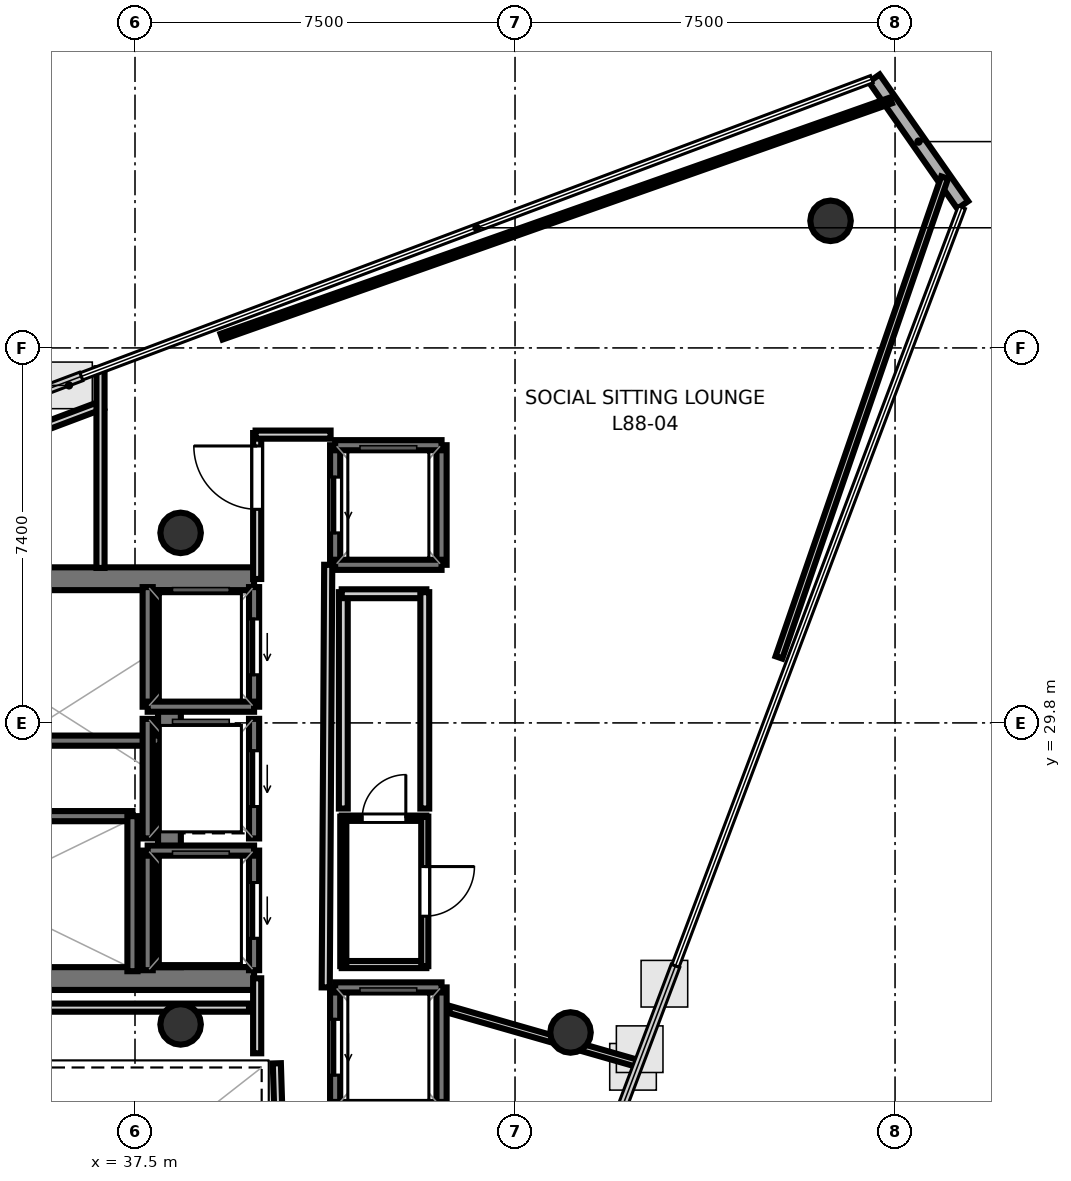
"""IFC4 building model, lengths in metres.
Left out: names, types, materials, properties, quantities, classifications, styles, units other than length and angle.
Written with IfcOpenShell. Run it as: python <this file> out.ifc"""

import sys

from ifc_helpers import new_model, si_unit, direction, frame, frame_2d, origin, origin_2d, place, context, subcontext, project, spatial, rectangle, hollow_circle, extrude, element, fill, save


model = new_model("IFC4")
c1 = context("Model", 3, precision=1e-05, world=origin(), true_north=direction((0.0, 1.0)))
c2 = subcontext(c1, "Body", "Model", "MODEL_VIEW")
j1 = project(units=[si_unit("LENGTHUNIT", "METRE"), si_unit("PLANEANGLEUNIT", "RADIAN")], contexts=[c1])
p1 = place(None, origin())
s1 = spatial("IfcSite", under=j1, at=p1, CompositionType="ELEMENT")
p2 = place(p1, origin())
s2 = spatial("IfcBuilding", under=s1, at=p2, CompositionType="ELEMENT")
p3 = place(p2, frame((0.0, 0.0, 340.7)))
s3 = spatial("IfcBuildingStorey", under=s2, at=p3, CompositionType="ELEMENT", Elevation=340.7)
p4 = place(p3, frame((29.33, 32.645, 0.0), z_axis=(0.0, 0.0, 1.0), x_axis=(1.0, 0.0, 0.0)))
e1 = element("IfcWall", 1, at=p4, inside=s3, PredefinedType="SHEAR", context=c2, shape_type="SweptSolid", body=[
    extrude(rectangle(XDim=10.52, YDim=0.45, at=frame_2d((5.26, 0.0))), origin(), (0.0, 0.0, 1.0), 3.52),
])
p5 = place(p4, frame((0.895, 0.0, 0.0)))
e2 = element("IfcOpeningElement", 2, at=p5, cuts=e1, PredefinedType="OPENING", context=c2, shape_type="SweptSolid", body=[
    extrude(rectangle(XDim=1.25, YDim=2.15, at=frame_2d((0.625, 1.075))), frame((0.0, 0.235, 0.0), z_axis=(0.0, -1.0, 0.0), x_axis=(1.0, 0.0, 0.0)), (0.0, 0.0, 1.0), 0.47),
])
p6 = place(p3, frame((29.33, 24.755, 0.0), z_axis=(0.0, 0.0, 1.0), x_axis=(1.0, 0.0, 0.0)))
e3 = element("IfcWall", 3, at=p6, inside=s3, PredefinedType="SHEAR", context=c2, shape_type="SweptSolid", body=[
    extrude(rectangle(XDim=10.52, YDim=0.45, at=frame_2d((5.26, 0.0))), origin(), (0.0, 0.0, 1.0), 3.52),
])
p7 = place(p6, frame((0.695, 0.0, 0.0)))
e4 = element("IfcOpeningElement", 4, at=p7, cuts=e3, PredefinedType="OPENING", context=c2, shape_type="SweptSolid", body=[
    extrude(rectangle(XDim=1.25, YDim=2.15, at=frame_2d((0.625, 1.075))), frame((0.0, 0.235, 0.0), z_axis=(0.0, -1.0, 0.0), x_axis=(1.0, 0.0, 0.0)), (0.0, 0.0, 1.0), 0.47),
])
p8 = place(p3, frame((38.18, 24.98, 0.0), z_axis=(0.0, 0.0, 1.0), x_axis=(0.0, 1.0, 0.0)))
e5 = element("IfcWall", 5, at=p8, inside=s3, PredefinedType="SHEAR", context=c2, shape_type="SweptSolid", body=[
    extrude(rectangle(XDim=7.44, YDim=0.45, at=frame_2d((3.72, 0.0))), origin(), (0.0, 0.0, 1.0), 3.52),
])
for number, where, z_axis, x_axis in (
    (6, (38.4, 33.55, 0.0), (0.0, 0.0, 1.0), (1.0, 0.0, 0.0)),
    (7, (38.4, 23.85, 0.0), (0.0, 0.0, 1.0), (1.0, 0.0, 0.0)),
    (8, (51.227, 39.708, 0.0), (0.0, 0.0, 1.0), (1.0, 0.0, 0.0)),
    (9, (46.095, 23.691, 0.0), (0.0, 0.0, 1.0), (1.0, 0.0, 0.0)),
):
    element("IfcColumn", number, at=place(p3, frame(where, z_axis=z_axis, x_axis=x_axis)), inside=s3, PredefinedType="COLUMN", context=c2, shape_type="SweptSolid", body=[
        extrude(hollow_circle(Radius=0.4, WallThickness=0.022, at=origin_2d()), origin(), (0.0, 0.0, 1.0), 3.7),
    ])
p9 = place(p3, frame((53.836, 40.021, 0.0), z_axis=(0.0, 0.0, 1.0), x_axis=(-0.572667183725, 0.819787958368, 0.0)))
e10 = element("IfcWall", 10, at=p9, inside=s3, PredefinedType="SOLIDWALL", context=c2, shape_type="SweptSolid", body=[
    extrude(rectangle(XDim=3.051, YDim=0.26, at=frame_2d((1.525, 0.0))), origin(), (0.0, 0.0, 1.0), 3.52),
])
p10 = place(p3, frame((29.7, 29.45, 0.0), z_axis=(0.0, 0.0, 1.0), x_axis=(1.0, 0.0, 0.0)))
e11 = element("IfcWall", 11, at=p10, inside=s3, PredefinedType="SOLIDWALL", context=c2, shape_type="SweptSolid", body=[
    extrude(rectangle(XDim=8.3, YDim=0.2, at=frame_2d((4.15, 0.0))), origin(), (0.0, 0.0, 1.0), 3.52),
])
p11 = place(p3, frame((29.7, 27.96, 0.0), z_axis=(0.0, 0.0, 1.0), x_axis=(1.0, 0.0, 0.0)))
e12 = element("IfcWall", 12, at=p11, inside=s3, PredefinedType="SOLIDWALL", context=c2, shape_type="SweptSolid", body=[
    extrude(rectangle(XDim=7.75, YDim=0.2, at=frame_2d((3.875, 0.0))), origin(), (0.0, 0.0, 1.0), 3.52),
])
p12 = place(p3, frame((37.45, 24.9, 0.0), z_axis=(0.0, 0.0, 1.0), x_axis=(0.0, 1.0, 0.0)))
e13 = element("IfcWall", 13, at=p12, inside=s3, PredefinedType="SOLIDWALL", context=c2, shape_type="SweptSolid", body=[
    extrude(rectangle(XDim=3.06, YDim=0.2, at=frame_2d((1.53, 0.0))), origin(), (0.0, 0.0, 1.0), 3.52),
])
p13 = place(p3, frame((39.85, 30.12, 0.0), z_axis=(0.0, 0.0, 1.0), x_axis=(0.0, 1.0, 0.0)))
e14 = element("IfcWall", 14, at=p13, inside=s3, PredefinedType="SOLIDWALL", context=c2, shape_type="SweptSolid", body=[
    extrude(rectangle(XDim=2.36, YDim=0.2, at=frame_2d((1.18, 0.0))), origin(), (0.0, 0.0, 1.0), 3.52),
])
p14 = place(p13, frame((0.63, 0.0, 0.0)))
e15 = element("IfcOpeningElement", 15, at=p14, cuts=e14, PredefinedType="OPENING", context=c2, shape_type="SweptSolid", body=[
    extrude(rectangle(XDim=1.1, YDim=2.15, at=frame_2d((0.55, 1.075))), frame((0.0, 0.11, 0.0), z_axis=(0.0, -1.0, 0.0), x_axis=(1.0, 0.0, 0.0)), (0.0, 0.0, 1.0), 0.22),
])
p15 = place(p3, frame((37.75, 30.12, 0.0), z_axis=(0.0, 0.0, 1.0), x_axis=(0.0, 1.0, 0.0)))
e16 = element("IfcWall", 16, at=p15, inside=s3, PredefinedType="SOLIDWALL", context=c2, shape_type="SweptSolid", body=[
    extrude(rectangle(XDim=2.36, YDim=0.2, at=frame_2d((1.18, 0.0))), origin(), (0.0, 0.0, 1.0), 3.52),
])
p16 = place(p3, frame((37.75, 30.12, 0.0), z_axis=(0.0, 0.0, 1.0), x_axis=(1.0, 0.0, 0.0)))
e17 = element("IfcWall", 17, at=p16, inside=s3, PredefinedType="SOLIDWALL", context=c2, shape_type="SweptSolid", body=[
    extrude(rectangle(XDim=2.1, YDim=0.2, at=frame_2d((1.05, 0.0))), origin(), (0.0, 0.0, 1.0), 3.52),
])
p17 = place(p3, frame((39.85, 24.92, 0.0), z_axis=(0.0, 0.0, 1.0), x_axis=(0.0, 1.0, 0.0)))
e18 = element("IfcWall", 18, at=p17, inside=s3, PredefinedType="SOLIDWALL", context=c2, shape_type="SweptSolid", body=[
    extrude(rectangle(XDim=2.36, YDim=0.2, at=frame_2d((1.18, 0.0))), origin(), (0.0, 0.0, 1.0), 3.52),
])
p18 = place(p17, frame((0.63, 0.0, 0.0)))
e19 = element("IfcOpeningElement", 19, at=p18, cuts=e18, PredefinedType="OPENING", context=c2, shape_type="SweptSolid", body=[
    extrude(rectangle(XDim=1.1, YDim=2.15, at=frame_2d((0.55, 1.075))), frame((0.0, 0.11, 0.0), z_axis=(0.0, -1.0, 0.0), x_axis=(1.0, 0.0, 0.0)), (0.0, 0.0, 1.0), 0.22),
])
p19 = place(p3, frame((37.75, 24.92, 0.0), z_axis=(0.0, 0.0, 1.0), x_axis=(0.0, 1.0, 0.0)))
e20 = element("IfcWall", 20, at=p19, inside=s3, PredefinedType="SOLIDWALL", context=c2, shape_type="SweptSolid", body=[
    extrude(rectangle(XDim=2.36, YDim=0.2, at=frame_2d((1.18, 0.0))), origin(), (0.0, 0.0, 1.0), 3.52),
])
p20 = place(p3, frame((37.75, 27.28, 0.0), z_axis=(0.0, 0.0, 1.0), x_axis=(1.0, 0.0, 0.0)))
e21 = element("IfcWall", 21, at=p20, inside=s3, PredefinedType="SOLIDWALL", context=c2, shape_type="SweptSolid", body=[
    extrude(rectangle(XDim=2.1, YDim=0.2, at=frame_2d((1.05, 0.0))), origin(), (0.0, 0.0, 1.0), 3.52),
])
p21 = place(p3, frame((39.85, 27.52, 0.0), z_axis=(0.0, 0.0, 1.0), x_axis=(0.0, 1.0, 0.0)))
e22 = element("IfcWall", 22, at=p21, inside=s3, PredefinedType="SOLIDWALL", context=c2, shape_type="SweptSolid", body=[
    extrude(rectangle(XDim=2.36, YDim=0.2, at=frame_2d((1.18, 0.0))), origin(), (0.0, 0.0, 1.0), 3.52),
])
p22 = place(p21, frame((0.63, 0.0, 0.0)))
e23 = element("IfcOpeningElement", 23, at=p22, cuts=e22, PredefinedType="OPENING", context=c2, shape_type="SweptSolid", body=[
    extrude(rectangle(XDim=1.1, YDim=2.15, at=frame_2d((0.55, 1.075))), frame((0.0, 0.11, 0.0), z_axis=(0.0, -1.0, 0.0), x_axis=(1.0, 0.0, 0.0)), (0.0, 0.0, 1.0), 0.22),
])
p23 = place(p3, frame((37.75, 27.52, 0.0), z_axis=(0.0, 0.0, 1.0), x_axis=(0.0, 1.0, 0.0)))
e24 = element("IfcWall", 24, at=p23, inside=s3, PredefinedType="SOLIDWALL", context=c2, shape_type="SweptSolid", body=[
    extrude(rectangle(XDim=2.36, YDim=0.2, at=frame_2d((1.18, 0.0))), origin(), (0.0, 0.0, 1.0), 3.52),
])
p24 = place(p3, frame((43.55, 22.22, 0.0), z_axis=(0.0, 0.0, 1.0), x_axis=(0.0, 1.0, 0.0)))
e25 = element("IfcWall", 25, at=p24, inside=s3, PredefinedType="SOLIDWALL", context=c2, shape_type="SweptSolid", body=[
    extrude(rectangle(XDim=2.36, YDim=0.2, at=frame_2d((1.18, 0.0))), origin(), (0.0, 0.0, 1.0), 3.52),
])
p25 = place(p3, frame((41.45, 22.22, 0.0), z_axis=(0.0, 0.0, 1.0), x_axis=(0.0, 1.0, 0.0)))
e26 = element("IfcWall", 26, at=p25, inside=s3, PredefinedType="SOLIDWALL", context=c2, shape_type="SweptSolid", body=[
    extrude(rectangle(XDim=2.36, YDim=0.2, at=frame_2d((1.18, 0.0))), origin(), (0.0, 0.0, 1.0), 3.52),
])
p26 = place(p25, frame((0.63, 0.0, 0.0)))
e27 = element("IfcOpeningElement", 27, at=p26, cuts=e26, PredefinedType="OPENING", context=c2, shape_type="SweptSolid", body=[
    extrude(rectangle(XDim=1.1, YDim=2.15, at=frame_2d((0.55, 1.075))), frame((0.0, 0.11, 0.0), z_axis=(0.0, -1.0, 0.0), x_axis=(1.0, 0.0, 0.0)), (0.0, 0.0, 1.0), 0.22),
])
for number, where, z_axis, x_axis in (
    (28, (41.45, 24.58, 0.0), (0.0, 0.0, 1.0), (1.0, 0.0, 0.0)),
    (29, (41.45, 22.22, 0.0), (0.0, 0.0, 1.0), (1.0, 0.0, 0.0)),
):
    element("IfcWall", number, at=place(p3, frame(where, z_axis=z_axis, x_axis=x_axis)), inside=s3, PredefinedType="SOLIDWALL", context=c2, shape_type="SweptSolid", body=[
        extrude(rectangle(XDim=2.1, YDim=0.2, at=frame_2d((1.05, 0.0))), origin(), (0.0, 0.0, 1.0), 3.52),
    ])
p27 = place(p3, frame((43.55, 32.92, 0.0), z_axis=(0.0, 0.0, 1.0), x_axis=(0.0, 1.0, 0.0)))
e30 = element("IfcWall", 30, at=p27, inside=s3, PredefinedType="SOLIDWALL", context=c2, shape_type="SweptSolid", body=[
    extrude(rectangle(XDim=2.36, YDim=0.2, at=frame_2d((1.18, 0.0))), origin(), (0.0, 0.0, 1.0), 3.52),
])
p28 = place(p3, frame((41.45, 32.92, 0.0), z_axis=(0.0, 0.0, 1.0), x_axis=(0.0, 1.0, 0.0)))
e31 = element("IfcWall", 31, at=p28, inside=s3, PredefinedType="SOLIDWALL", context=c2, shape_type="SweptSolid", body=[
    extrude(rectangle(XDim=2.36, YDim=0.2, at=frame_2d((1.18, 0.0))), origin(), (0.0, 0.0, 1.0), 3.52),
])
p29 = place(p28, frame((0.63, 0.0, 0.0)))
e32 = element("IfcOpeningElement", 32, at=p29, cuts=e31, PredefinedType="OPENING", context=c2, shape_type="SweptSolid", body=[
    extrude(rectangle(XDim=1.1, YDim=2.15, at=frame_2d((0.55, 1.075))), frame((0.0, 0.11, 0.0), z_axis=(0.0, -1.0, 0.0), x_axis=(1.0, 0.0, 0.0)), (0.0, 0.0, 1.0), 0.22),
])
for number, where, z_axis, x_axis in (
    (33, (41.45, 35.28, 0.0), (0.0, 0.0, 1.0), (1.0, 0.0, 0.0)),
    (34, (41.45, 32.92, 0.0), (0.0, 0.0, 1.0), (1.0, 0.0, 0.0)),
):
    element("IfcWall", number, at=place(p3, frame(where, z_axis=z_axis, x_axis=x_axis)), inside=s3, PredefinedType="SOLIDWALL", context=c2, shape_type="SweptSolid", body=[
        extrude(rectangle(XDim=2.1, YDim=0.2, at=frame_2d((1.05, 0.0))), origin(), (0.0, 0.0, 1.0), 3.52),
    ])
p30 = place(p3, frame((29.761, 33.409, 0.0), z_axis=(0.0, 0.0, 1.0), x_axis=(0.936004712995, 0.351987467464, 0.0)))
e35 = element("IfcWall", 35, at=p30, inside=s3, PredefinedType="PARTITIONING", context=c2, shape_type="SweptSolid", body=[
    extrude(rectangle(XDim=7.585, YDim=0.16, at=frame_2d((3.792, 0.0))), origin(), (0.0, 0.0, 1.0), 2.84),
])
p31 = place(p3, frame((36.819, 36.8, 0.0), z_axis=(0.0, 0.0, 1.0), x_axis=(0.0, -1.0, 0.0)))
e36 = element("IfcWall", 36, at=p31, inside=s3, PredefinedType="PARTITIONING", context=c2, shape_type="SweptSolid", body=[
    extrude(rectangle(XDim=3.942, YDim=0.16, at=frame_2d((1.971, 0.0))), origin(), (0.0, 0.0, 1.0), 2.84),
])
p32 = place(p3, frame((40.351, 21.401, 0.0), z_axis=(0.0, 0.0, 1.0), x_axis=(-0.031058045979, 0.999517582527, 0.0)))
e37 = element("IfcWall", 37, at=p32, inside=s3, PredefinedType="PARTITIONING", context=c2, shape_type="SweptSolid", body=[
    extrude(rectangle(XDim=1.682, YDim=0.16, at=frame_2d((0.841, 0.0))), origin(), (0.0, 0.0, 1.0), 2.84),
])
p33 = place(p3, frame((39.911, 23.28, 0.0), z_axis=(0.0, 0.0, 1.0), x_axis=(0.0, 1.0, 0.0)))
e38 = element("IfcWall", 38, at=p33, inside=s3, PredefinedType="PARTITIONING", context=c2, shape_type="SweptSolid", body=[
    extrude(rectangle(XDim=1.48, YDim=0.16, at=frame_2d((0.74, 0.0))), origin(), (0.0, 0.0, 1.0), 2.84),
])
p34 = place(p3, frame((39.911, 32.64, 0.0), z_axis=(0.0, 0.0, 1.0), x_axis=(0.0, 1.0, 0.0)))
e39 = element("IfcWall", 39, at=p34, inside=s3, PredefinedType="PARTITIONING", context=c2, shape_type="SweptSolid", body=[
    extrude(rectangle(XDim=2.88, YDim=0.16, at=frame_2d((1.44, 0.0))), origin(), (0.0, 0.0, 1.0), 2.84),
])
p35 = place(p34, frame((1.375, 0.0, 0.0)))
e40 = element("IfcOpeningElement", 40, at=p35, cuts=e39, PredefinedType="OPENING", context=c2, shape_type="SweptSolid", body=[
    extrude(rectangle(XDim=1.25, YDim=2.2, at=frame_2d((0.625, 1.1))), frame((0.0, 0.09, 0.0), z_axis=(0.0, -1.0, 0.0), x_axis=(1.0, 0.0, 0.0)), (0.0, 0.0, 1.0), 0.18),
])
p36 = place(p3, frame((39.88, 35.489, 0.0), z_axis=(0.0, 0.0, 1.0), x_axis=(1.0, 0.0, 0.0)))
e41 = element("IfcWall", 41, at=p36, inside=s3, PredefinedType="PARTITIONING", context=c2, shape_type="SweptSolid", body=[
    extrude(rectangle(XDim=1.48, YDim=0.16, at=frame_2d((0.74, 0.0))), origin(), (0.0, 0.0, 1.0), 2.84),
])
p37 = place(p3, frame((41.313, 32.92, 0.0), z_axis=(0.0, 0.0, 1.0), x_axis=(-0.005942518022, -0.999982343084, 0.0)))
e42 = element("IfcWall", 42, at=p37, inside=s3, PredefinedType="PARTITIONING", context=c2, shape_type="SweptSolid", body=[
    extrude(rectangle(XDim=8.34, YDim=0.16, at=frame_2d((4.17, 0.0))), origin(), (0.0, 0.0, 1.0), 2.84),
])
p38 = place(p3, frame((43.25, 25.031, 0.0), z_axis=(0.0, 0.0, 1.0), x_axis=(-1.0, 0.0, 0.0)))
e43 = element("IfcWall", 43, at=p38, inside=s3, PredefinedType="PARTITIONING", context=c2, shape_type="SweptSolid", body=[
    extrude(rectangle(XDim=1.67, YDim=0.14, at=frame_2d((0.835, 0.0))), origin(), (0.0, 0.0, 1.0), 2.84),
])
p39 = place(p3, frame((41.611, 25.0, 0.0), z_axis=(0.0, 0.0, 1.0), x_axis=(0.0, 1.0, 0.0)))
e44 = element("IfcWall", 44, at=p39, inside=s3, PredefinedType="PARTITIONING", context=c2, shape_type="SweptSolid", body=[
    extrude(rectangle(XDim=2.95, YDim=0.12, at=frame_2d((1.475, 0.0))), origin(), (0.0, 0.0, 1.0), 2.84),
])
p40 = place(p3, frame((41.58, 27.919, 0.0), z_axis=(0.0, 0.0, 1.0), x_axis=(1.0, 0.0, 0.0)))
e45 = element("IfcWall", 45, at=p40, inside=s3, PredefinedType="PARTITIONING", context=c2, shape_type="SweptSolid", body=[
    extrude(rectangle(XDim=1.67, YDim=0.105, at=frame_2d((0.835, 0.0))), origin(), (0.0, 0.0, 1.0), 2.84),
])
p41 = place(p40, frame((0.405, 0.0, 0.0)))
e46 = element("IfcOpeningElement", 46, at=p41, cuts=e45, PredefinedType="OPENING", context=c2, shape_type="SweptSolid", body=[
    extrude(rectangle(XDim=0.86, YDim=2.05, at=frame_2d((0.43, 1.025))), frame((0.0, 0.062, 0.0), z_axis=(0.0, -1.0, 0.0), x_axis=(1.0, 0.0, 0.0)), (0.0, 0.0, 1.0), 0.125),
])
p42 = place(p3, frame((43.219, 27.95, 0.0), z_axis=(0.0, 0.0, 1.0), x_axis=(0.0, -1.0, 0.0)))
e47 = element("IfcWall", 47, at=p42, inside=s3, PredefinedType="PARTITIONING", context=c2, shape_type="SweptSolid", body=[
    extrude(rectangle(XDim=2.95, YDim=0.14, at=frame_2d((1.475, 0.0))), origin(), (0.0, 0.0, 1.0), 2.84),
])
p43 = place(p42, frame((0.985, 0.0, 0.0)))
e48 = element("IfcOpeningElement", 48, at=p43, cuts=e47, PredefinedType="OPENING", context=c2, shape_type="SweptSolid", body=[
    extrude(rectangle(XDim=0.98, YDim=2.1, at=frame_2d((0.49, 1.05))), frame((0.0, 0.08, 0.0), z_axis=(0.0, -1.0, 0.0), x_axis=(1.0, 0.0, 0.0)), (0.0, 0.0, 1.0), 0.16),
])
p44 = place(p3, frame((41.611, 28.11, 0.0), z_axis=(0.0, 0.0, 1.0), x_axis=(0.0, 1.0, 0.0)))
e49 = element("IfcWall", 49, at=p44, inside=s3, PredefinedType="PLUMBINGWALL", context=c2, shape_type="SweptSolid", body=[
    extrude(rectangle(XDim=4.27, YDim=0.175, at=frame_2d((2.135, 0.0))), origin(), (0.0, 0.0, 1.0), 2.84),
])
p45 = place(p3, frame((41.58, 32.349, 0.0), z_axis=(0.0, 0.0, 1.0), x_axis=(1.0, 0.0, 0.0)))
e50 = element("IfcWall", 50, at=p45, inside=s3, PredefinedType="PLUMBINGWALL", context=c2, shape_type="SweptSolid", body=[
    extrude(rectangle(XDim=1.67, YDim=0.175, at=frame_2d((0.835, 0.0))), origin(), (0.0, 0.0, 1.0), 2.84),
])
p46 = place(p3, frame((43.219, 32.38, 0.0), z_axis=(0.0, 0.0, 1.0), x_axis=(0.0, -1.0, 0.0)))
e51 = element("IfcWall", 51, at=p46, inside=s3, PredefinedType="PLUMBINGWALL", context=c2, shape_type="SweptSolid", body=[
    extrude(rectangle(XDim=4.27, YDim=0.175, at=frame_2d((2.135, 0.0))), origin(), (0.0, 0.0, 1.0), 2.84),
])
p47 = place(p3, frame((39.75, 24.181, 0.0), z_axis=(0.0, 0.0, 1.0), x_axis=(-1.0, 0.0, 0.0)))
e52 = element("IfcWall", 52, at=p47, inside=s3, PredefinedType="PARTITIONING", context=c2, shape_type="SweptSolid", body=[
    extrude(rectangle(XDim=6.22, YDim=0.16, at=frame_2d((3.11, 0.0))), origin(), (0.0, 0.0, 1.0), 2.84),
])
p48 = place(p3, frame((43.711, 24.143, 0.0), z_axis=(0.0, 0.0, 1.0), x_axis=(0.9612562867, -0.275656219374, 0.0)))
e53 = element("IfcWall", 53, at=p48, inside=s3, PredefinedType="PARTITIONING", context=c2, shape_type="SweptSolid", body=[
    extrude(rectangle(XDim=3.896, YDim=0.14, at=frame_2d((1.948, 0.0))), origin(), (0.0, 0.0, 1.0), 2.84),
])
p49 = place(p3, frame((39.208, 37.422, 0.0), z_axis=(0.0, 0.0, 1.0), x_axis=(0.943004810964, 0.332779095645, 0.0)))
e54 = element("IfcWall", 54, at=p49, inside=s3, PredefinedType="PARTITIONING", context=c2, shape_type="SweptSolid", body=[
    extrude(rectangle(XDim=14.009, YDim=0.12, at=frame_2d((7.004, 0.0))), origin(), (0.0, 0.0, 1.0), 2.84),
])
p50 = place(p3, frame((53.479, 40.562, 0.0), z_axis=(0.0, 0.0, 1.0), x_axis=(-0.326414961358, -0.945226572311, 0.0)))
e55 = element("IfcWall", 55, at=p50, inside=s3, PredefinedType="PARTITIONING", context=c2, shape_type="SweptSolid", body=[
    extrude(rectangle(XDim=10.019, YDim=0.14, at=frame_2d((5.009, 0.0))), origin(), (0.0, 0.0, 1.0), 2.84),
])
p51 = place(p14, origin())
e56 = element("IfcDoor", 56, at=p51, inside=s3, OperationType="SLIDING_TO_LEFT", PredefinedType="DOOR", context=c2, shape_type="SweptSolid", body=[
    extrude(rectangle(XDim=1.1, YDim=2.15, at=frame_2d((0.55, 1.075))), frame((0.0, 0.025, 0.0), z_axis=(0.0, -1.0, 0.0), x_axis=(1.0, 0.0, 0.0)), (0.0, 0.0, 1.0), 0.05),
])
fill(e15, e56)
p52 = place(p18, origin())
e57 = element("IfcDoor", 57, at=p52, inside=s3, OperationType="SLIDING_TO_LEFT", PredefinedType="DOOR", context=c2, shape_type="SweptSolid", body=[
    extrude(rectangle(XDim=1.1, YDim=2.15, at=frame_2d((0.55, 1.075))), frame((0.0, 0.025, 0.0), z_axis=(0.0, -1.0, 0.0), x_axis=(1.0, 0.0, 0.0)), (0.0, 0.0, 1.0), 0.05),
])
fill(e19, e57)
p53 = place(p22, origin())
e58 = element("IfcDoor", 58, at=p53, inside=s3, OperationType="SLIDING_TO_LEFT", PredefinedType="DOOR", context=c2, shape_type="SweptSolid", body=[
    extrude(rectangle(XDim=1.1, YDim=2.15, at=frame_2d((0.55, 1.075))), frame((0.0, 0.025, 0.0), z_axis=(0.0, -1.0, 0.0), x_axis=(1.0, 0.0, 0.0)), (0.0, 0.0, 1.0), 0.05),
])
fill(e23, e58)
p54 = place(p26, origin())
e59 = element("IfcDoor", 59, at=p54, inside=s3, OperationType="SLIDING_TO_LEFT", PredefinedType="DOOR", context=c2, shape_type="SweptSolid", body=[
    extrude(rectangle(XDim=1.1, YDim=2.15, at=frame_2d((0.55, 1.075))), frame((0.0, 0.025, 0.0), z_axis=(0.0, -1.0, 0.0), x_axis=(1.0, 0.0, 0.0)), (0.0, 0.0, 1.0), 0.05),
])
fill(e27, e59)
p55 = place(p29, origin())
e60 = element("IfcDoor", 60, at=p55, inside=s3, OperationType="SLIDING_TO_LEFT", PredefinedType="DOOR", context=c2, shape_type="SweptSolid", body=[
    extrude(rectangle(XDim=1.1, YDim=2.15, at=frame_2d((0.55, 1.075))), frame((0.0, 0.025, 0.0), z_axis=(0.0, -1.0, 0.0), x_axis=(1.0, 0.0, 0.0)), (0.0, 0.0, 1.0), 0.05),
])
fill(e32, e60)
p56 = place(p35, origin())
e61 = element("IfcDoor", 61, at=p56, inside=s3, OperationType="SINGLE_SWING_RIGHT", PredefinedType="DOOR", context=c2, shape_type="SweptSolid", body=[
    extrude(rectangle(XDim=1.25, YDim=2.2, at=frame_2d((0.625, 1.1))), frame((0.0, 0.025, 0.0), z_axis=(0.0, -1.0, 0.0), x_axis=(1.0, 0.0, 0.0)), (0.0, 0.0, 1.0), 0.05),
])
fill(e40, e61)
p57 = place(p43, origin())
e62 = element("IfcDoor", 62, at=p57, inside=s3, OperationType="SINGLE_SWING_LEFT", PredefinedType="DOOR", context=c2, shape_type="SweptSolid", body=[
    extrude(rectangle(XDim=0.98, YDim=2.1, at=frame_2d((0.49, 1.05))), frame((0.0, 0.025, 0.0), z_axis=(0.0, -1.0, 0.0), x_axis=(1.0, 0.0, 0.0)), (0.0, 0.0, 1.0), 0.05),
])
fill(e48, e62)
p58 = place(p41, origin())
e63 = element("IfcDoor", 63, at=p58, inside=s3, OperationType="SINGLE_SWING_RIGHT", PredefinedType="DOOR", context=c2, shape_type="SweptSolid", body=[
    extrude(rectangle(XDim=0.86, YDim=2.05, at=frame_2d((0.43, 1.025))), frame((0.0, 0.025, 0.0), z_axis=(0.0, -1.0, 0.0), x_axis=(1.0, 0.0, 0.0)), (0.0, 0.0, 1.0), 0.05),
])
fill(e46, e63)
save(model, sys.argv[1])
